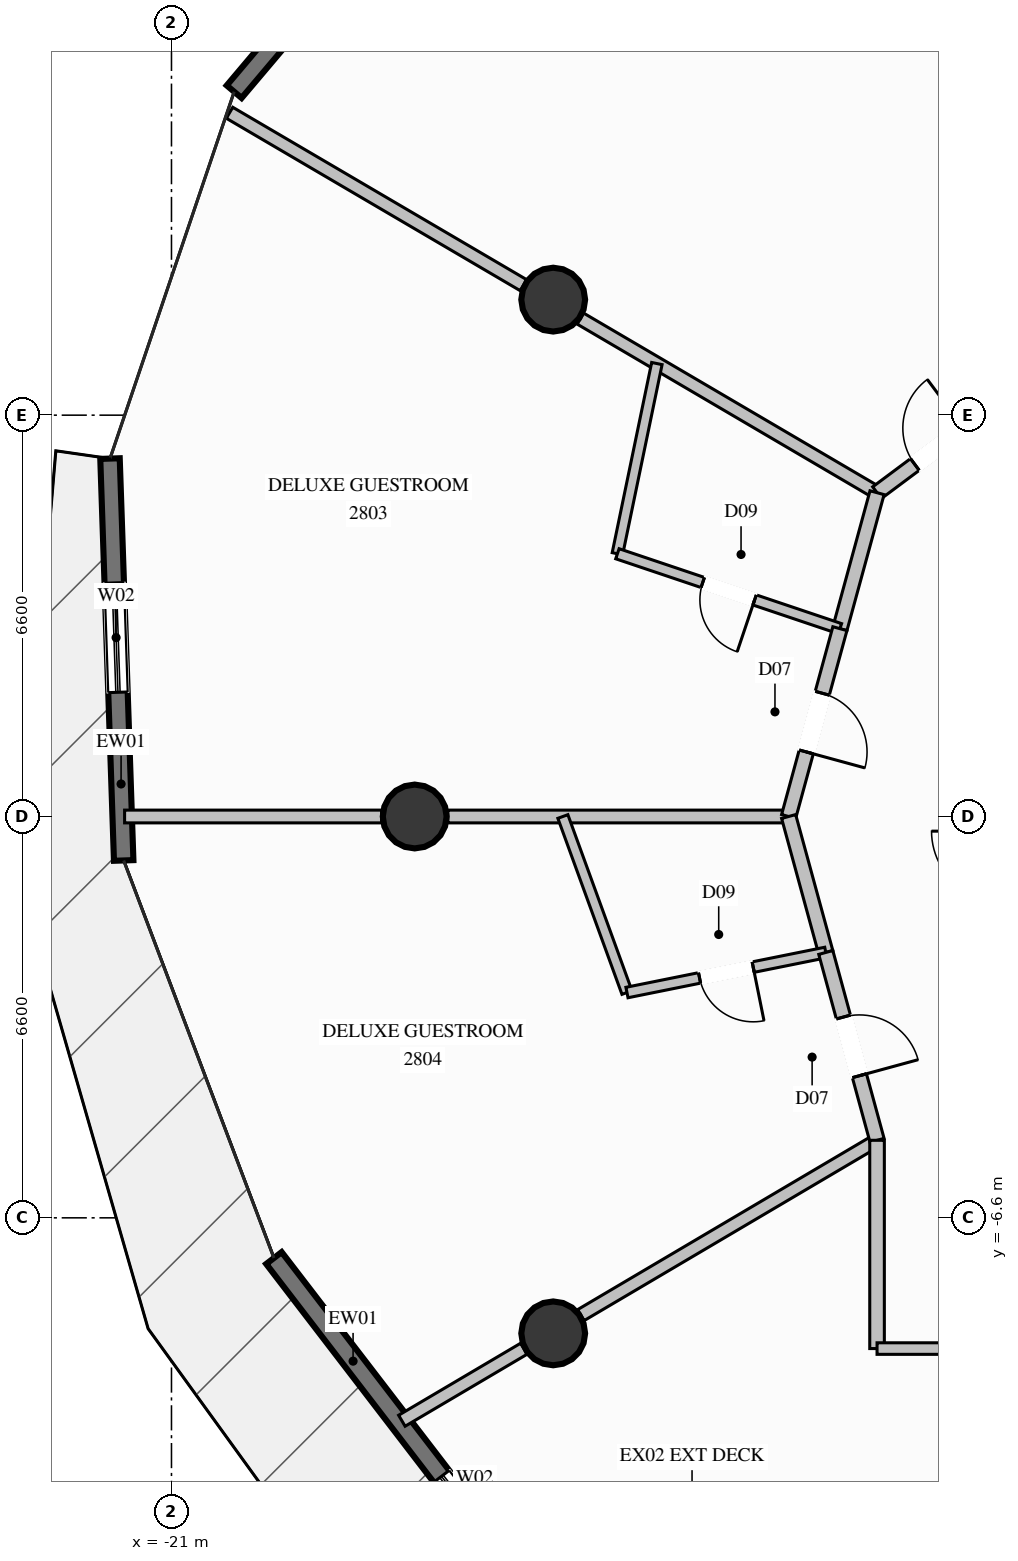
"""IFC4 building model, lengths in metres.
Left out: names, types, materials, properties, quantities, classifications, styles, units other than length and angle.
Written with IfcOpenShell. Run it as: python <this file> out.ifc"""

import sys

from ifc_helpers import new_model, si_unit, direction, frame, frame_2d, origin, origin_2d, place, context, subcontext, project, spatial, rectangle, circle, extrude, element, fill, save


model = new_model("IFC4")
c1 = context("Model", 3, precision=1e-05, world=origin(), true_north=direction((0.0, 1.0)))
c2 = subcontext(c1, "Body", "Model", "MODEL_VIEW")
j1 = project(units=[si_unit("LENGTHUNIT", "METRE"), si_unit("PLANEANGLEUNIT", "RADIAN")], contexts=[c1])
p1 = place(None, origin())
s1 = spatial("IfcSite", under=j1, at=p1, CompositionType="ELEMENT")
p2 = place(p1, origin())
s2 = spatial("IfcBuilding", under=s1, at=p2, CompositionType="ELEMENT")
p3 = place(p2, frame((0.0, 0.0, 106.2)))
s3 = spatial("IfcBuildingStorey", under=s2, at=p3, CompositionType="ELEMENT", Elevation=106.2)
for number, where, z_axis, x_axis in (
    (1, (-14.722, 8.5, 0.0), (0.0, 0.0, 1.0), (1.0, 0.0, 0.0)),
    (2, (-17.0, 0.0, 0.0), (0.0, 0.0, 1.0), (1.0, 0.0, 0.0)),
    (3, (-14.722, -8.5, 0.0), (0.0, 0.0, 1.0), (1.0, 0.0, 0.0)),
):
    element("IfcColumn", number, at=place(p3, frame(where, z_axis=z_axis, x_axis=x_axis)), inside=s3, PredefinedType="COLUMN", context=c2, shape_type="SweptSolid", body=[
        extrude(circle(Radius=0.525, at=origin_2d()), origin(), (0.0, 0.0, 1.0), 3.6),
    ])
p4 = place(p3, frame((-19.969, 11.919, 0.0), z_axis=(0.0, 0.0, 1.0), x_axis=(0.645278763483, 0.763947195425, 0.0)))
e4 = element("IfcWall", 4, at=p4, inside=s3, PredefinedType="SOLIDWALL", context=c2, shape_type="SweptSolid", body=[
    extrude(rectangle(XDim=6.369, YDim=0.32, at=frame_2d((3.185, 0.0))), origin(), (0.0, 0.0, 1.0), 3.35),
])
p5 = place(p4, frame((1.905, 0.0, 0.35)))
e5 = element("IfcOpeningElement", 5, at=p5, cuts=e4, PredefinedType="OPENING", context=c2, shape_type="SweptSolid", body=[
    extrude(rectangle(XDim=1.8, YDim=2.6, at=frame_2d((0.9, 1.3))), frame((0.0, 0.17, 0.0), z_axis=(0.0, -1.0, 0.0), x_axis=(1.0, 0.0, 0.0)), (0.0, 0.0, 1.0), 0.34),
])
p6 = place(p3, frame((-21.786, -0.723, 0.0), z_axis=(0.0, 0.0, 1.0), x_axis=(-0.034040106065, 0.999420467661, 0.0)))
e6 = element("IfcWall", 6, at=p6, inside=s3, PredefinedType="SOLIDWALL", context=c2, shape_type="SweptSolid", body=[
    extrude(rectangle(XDim=6.613, YDim=0.32, at=frame_2d((3.306, 0.0))), origin(), (0.0, 0.0, 1.0), 3.35),
])
p7 = place(p6, frame((2.767, 0.0, 0.35)))
e7 = element("IfcOpeningElement", 7, at=p7, cuts=e6, PredefinedType="OPENING", context=c2, shape_type="SweptSolid", body=[
    extrude(rectangle(XDim=1.8, YDim=2.6, at=frame_2d((0.9, 1.3))), frame((0.0, 0.17, 0.0), z_axis=(0.0, -1.0, 0.0), x_axis=(1.0, 0.0, 0.0)), (0.0, 0.0, 1.0), 0.34),
])
p8 = place(p3, frame((-14.842, -13.089, 0.0), z_axis=(0.0, 0.0, 1.0), x_axis=(-0.608831916989, 0.793299247986, 0.0)))
e8 = element("IfcWall", 8, at=p8, inside=s3, PredefinedType="SOLIDWALL", context=c2, shape_type="SweptSolid", body=[
    extrude(rectangle(XDim=7.347, YDim=0.32, at=frame_2d((3.673, 0.0))), origin(), (0.0, 0.0, 1.0), 3.35),
])
p9 = place(p8, frame((1.021, 0.0, 0.35)))
e9 = element("IfcOpeningElement", 9, at=p9, cuts=e8, PredefinedType="OPENING", context=c2, shape_type="SweptSolid", body=[
    extrude(rectangle(XDim=1.8, YDim=2.6, at=frame_2d((0.9, 1.3))), frame((0.0, 0.17, 0.0), z_axis=(0.0, -1.0, 0.0), x_axis=(1.0, 0.0, 0.0)), (0.0, 0.0, 1.0), 0.34),
])
p10 = place(p3, frame((-9.396, 5.325, 0.0), z_axis=(0.0, 0.0, 1.0), x_axis=(-0.862467386777, 0.50611264235, 0.0)))
e10 = element("IfcWall", 10, at=p10, inside=s3, PredefinedType="PARTITIONING", context=c2, shape_type="SweptSolid", body=[
    extrude(rectangle(XDim=5.657, YDim=0.21, at=frame_2d((2.829, 0.0))), origin(), (0.0, 0.0, 1.0), 2.719),
])
p11 = place(p3, frame((-15.212, 8.738, 0.0), z_axis=(0.0, 0.0, 1.0), x_axis=(-0.862556345738, 0.505961016706, 0.0)))
e11 = element("IfcWall", 11, at=p11, inside=s3, PredefinedType="PARTITIONING", context=c2, shape_type="SweptSolid", body=[
    extrude(rectangle(XDim=5.603, YDim=0.21, at=frame_2d((2.802, 0.0))), origin(), (0.0, 0.0, 1.0), 3.35),
])
p12 = place(p3, frame((-10.85, 0.0, 0.0), z_axis=(0.0, 0.0, 1.0), x_axis=(-1.0, 0.0, 0.0)))
e12 = element("IfcWall", 12, at=p12, inside=s3, PredefinedType="PARTITIONING", context=c2, shape_type="SweptSolid", body=[
    extrude(rectangle(XDim=5.605, YDim=0.21, at=frame_2d((2.802, 0.0))), origin(), (0.0, 0.0, 1.0), 3.35),
])
p13 = place(p3, frame((-17.545, 0.0, 0.0), z_axis=(0.0, 0.0, 1.0), x_axis=(-1.0, 0.0, 0.0)))
e13 = element("IfcWall", 13, at=p13, inside=s3, PredefinedType="PARTITIONING", context=c2, shape_type="SweptSolid", body=[
    extrude(rectangle(XDim=4.226, YDim=0.21, at=frame_2d((2.113, 0.0))), origin(), (0.0, 0.0, 1.0), 3.35),
])
p14 = place(p3, frame((-9.396, -5.325, 0.0), z_axis=(0.0, 0.0, 1.0), x_axis=(-0.861187639937, -0.508287171607, 0.0)))
e14 = element("IfcWall", 14, at=p14, inside=s3, PredefinedType="PARTITIONING", context=c2, shape_type="SweptSolid", body=[
    extrude(rectangle(XDim=5.656, YDim=0.21, at=frame_2d((2.828, 0.0))), origin(), (0.0, 0.0, 1.0), 2.719),
])
p15 = place(p3, frame((-15.205, -8.753, 0.0), z_axis=(0.0, 0.0, 1.0), x_axis=(-0.861151801863, -0.508347886932, 0.0)))
e15 = element("IfcWall", 15, at=p15, inside=s3, PredefinedType="PARTITIONING", context=c2, shape_type="SweptSolid", body=[
    extrude(rectangle(XDim=2.329, YDim=0.21, at=frame_2d((1.165, 0.0))), origin(), (0.0, 0.0, 1.0), 3.35),
])
p16 = place(p3, frame((-9.396, 5.325, 0.0), z_axis=(0.0, 0.0, 1.0), x_axis=(0.8017416961, 0.597670689205, 0.0)))
e16 = element("IfcWall", 16, at=p16, inside=s3, PredefinedType="PARTITIONING", context=c2, shape_type="SweptSolid", body=[
    extrude(rectangle(XDim=2.552, YDim=0.24, at=frame_2d((1.276, 0.0))), origin(), (0.0, 0.0, 1.0), 3.35),
])
p17 = place(p16, frame((0.776, 0.0, 0.0)))
e17 = element("IfcOpeningElement", 17, at=p17, cuts=e16, PredefinedType="OPENING", context=c2, shape_type="SweptSolid", body=[
    extrude(rectangle(XDim=1.0, YDim=2.2, at=frame_2d((0.5, 1.1))), frame((0.0, 0.13, 0.0), z_axis=(0.0, -1.0, 0.0), x_axis=(1.0, 0.0, 0.0)), (0.0, 0.0, 1.0), 0.26),
])
p18 = place(p3, frame((-9.396, 5.325, 0.0), z_axis=(0.0, 0.0, 1.0), x_axis=(-0.263643210908, -0.964620265878, 0.0)))
e18 = element("IfcWall", 18, at=p18, inside=s3, PredefinedType="PARTITIONING", context=c2, shape_type="SweptSolid", body=[
    extrude(rectangle(XDim=2.318, YDim=0.24, at=frame_2d((1.159, 0.0))), origin(), (0.0, 0.0, 1.0), 3.35),
])
p19 = place(p3, frame((-13.017, 7.449, 0.0), z_axis=(0.0, 0.0, 1.0), x_axis=(-0.203136275653, -0.979150475419, 0.0)))
e19 = element("IfcWall", 19, at=p19, inside=s3, PredefinedType="PLUMBINGWALL", context=c2, shape_type="SweptSolid", body=[
    extrude(rectangle(XDim=3.195, YDim=0.175, at=frame_2d((1.597, 0.0))), origin(), (0.0, 0.0, 1.0), 3.35),
])
p20 = place(p3, frame((-10.007, 3.089, 0.0), z_axis=(0.0, 0.0, 1.0), x_axis=(-0.947724103288, 0.319090933822, 0.0)))
e20 = element("IfcWall", 20, at=p20, inside=s3, PredefinedType="PLUMBINGWALL", context=c2, shape_type="SweptSolid", body=[
    extrude(rectangle(XDim=3.861, YDim=0.175, at=frame_2d((1.93, 0.0))), origin(), (0.0, 0.0, 1.0), 3.35),
])
p21 = place(p20, frame((1.48, 0.0, 0.0)))
e21 = element("IfcOpeningElement", 21, at=p21, cuts=e20, PredefinedType="OPENING", context=c2, shape_type="SweptSolid", body=[
    extrude(rectangle(XDim=0.9, YDim=2.1, at=frame_2d((0.45, 1.05))), frame((0.0, 0.098, 0.0), z_axis=(0.0, -1.0, 0.0), x_axis=(1.0, 0.0, 0.0)), (0.0, 0.0, 1.0), 0.195),
])
p22 = place(p3, frame((-10.007, 3.089, 0.0), z_axis=(0.0, 0.0, 1.0), x_axis=(-0.263272237376, -0.964721581093, 0.0)))
e22 = element("IfcWall", 22, at=p22, inside=s3, PredefinedType="PARTITIONING", context=c2, shape_type="SweptSolid", body=[
    extrude(rectangle(XDim=3.202, YDim=0.24, at=frame_2d((1.601, 0.0))), origin(), (0.0, 0.0, 1.0), 3.35),
])
p23 = place(p22, frame((1.101, 0.0, 0.0)))
e23 = element("IfcOpeningElement", 23, at=p23, cuts=e22, PredefinedType="OPENING", context=c2, shape_type="SweptSolid", body=[
    extrude(rectangle(XDim=1.0, YDim=2.2, at=frame_2d((0.5, 1.1))), frame((0.0, 0.13, 0.0), z_axis=(0.0, -1.0, 0.0), x_axis=(1.0, 0.0, 0.0)), (0.0, 0.0, 1.0), 0.26),
])
p24 = place(p3, frame((-10.85, 0.0, 0.0), z_axis=(0.0, 0.0, 1.0), x_axis=(0.263616426241, -0.964627586074, 0.0)))
e24 = element("IfcWall", 24, at=p24, inside=s3, PredefinedType="PARTITIONING", context=c2, shape_type="SweptSolid", body=[
    extrude(rectangle(XDim=2.318, YDim=0.24, at=frame_2d((1.159, 0.0))), origin(), (0.0, 0.0, 1.0), 3.35),
])
p25 = place(p3, frame((-14.563, 0.0, 0.0), z_axis=(0.0, 0.0, 1.0), x_axis=(0.342092982083, -0.939666106449, 0.0)))
e25 = element("IfcWall", 25, at=p25, inside=s3, PredefinedType="PLUMBINGWALL", context=c2, shape_type="SweptSolid", body=[
    extrude(rectangle(XDim=3.081, YDim=0.175, at=frame_2d((1.541, 0.0))), origin(), (0.0, 0.0, 1.0), 3.35),
])
p26 = place(p3, frame((-10.239, -2.236, 0.0), z_axis=(0.0, 0.0, 1.0), x_axis=(-0.980295333609, -0.197537487338, 0.0)))
e26 = element("IfcWall", 26, at=p26, inside=s3, PredefinedType="PLUMBINGWALL", context=c2, shape_type="SweptSolid", body=[
    extrude(rectangle(XDim=3.336, YDim=0.175, at=frame_2d((1.668, 0.0))), origin(), (0.0, 0.0, 1.0), 3.35),
])
p27 = place(p26, frame((1.218, 0.0, 0.0)))
e27 = element("IfcOpeningElement", 27, at=p27, cuts=e26, PredefinedType="OPENING", context=c2, shape_type="SweptSolid", body=[
    extrude(rectangle(XDim=0.9, YDim=2.1, at=frame_2d((0.45, 1.05))), frame((0.0, 0.098, 0.0), z_axis=(0.0, -1.0, 0.0), x_axis=(1.0, 0.0, 0.0)), (0.0, 0.0, 1.0), 0.195),
])
p28 = place(p3, frame((-10.239, -2.236, 0.0), z_axis=(0.0, 0.0, 1.0), x_axis=(0.26329160366, -0.964716295831, 0.0)))
e28 = element("IfcWall", 28, at=p28, inside=s3, PredefinedType="PARTITIONING", context=c2, shape_type="SweptSolid", body=[
    extrude(rectangle(XDim=3.202, YDim=0.24, at=frame_2d((1.601, 0.0))), origin(), (0.0, 0.0, 1.0), 3.35),
])
p29 = place(p28, frame((1.101, 0.0, 0.0)))
e29 = element("IfcOpeningElement", 29, at=p29, cuts=e28, PredefinedType="OPENING", context=c2, shape_type="SweptSolid", body=[
    extrude(rectangle(XDim=1.0, YDim=2.2, at=frame_2d((0.5, 1.1))), frame((0.0, 0.13, 0.0), z_axis=(0.0, -1.0, 0.0), x_axis=(1.0, 0.0, 0.0)), (0.0, 0.0, 1.0), 0.26),
])
p30 = place(p3, frame((-9.396, -5.325, 0.0), z_axis=(0.0, 0.0, 1.0), x_axis=(0.0, -1.0, 0.0)))
e30 = element("IfcWall", 30, at=p30, inside=s3, PredefinedType="PARTITIONING", context=c2, shape_type="SweptSolid", body=[
    extrude(rectangle(XDim=3.425, YDim=0.24, at=frame_2d((1.712, 0.0))), origin(), (0.0, 0.0, 1.0), 3.35),
])
p31 = place(p3, frame((-9.396, -8.75, 0.0), z_axis=(0.0, 0.0, 1.0), x_axis=(1.0, 0.0, 0.0)))
e31 = element("IfcWall", 31, at=p31, inside=s3, PredefinedType="PARTITIONING", context=c2, shape_type="SweptSolid", body=[
    extrude(rectangle(XDim=4.228, YDim=0.19, at=frame_2d((2.114, 0.0))), origin(), (0.0, 0.0, 1.0), 3.35),
])
p32 = place(p31, frame((1.639, 0.0, 0.0)))
e32 = element("IfcOpeningElement", 32, at=p32, cuts=e31, PredefinedType="OPENING", context=c2, shape_type="SweptSolid", body=[
    extrude(rectangle(XDim=0.95, YDim=2.1, at=frame_2d((0.475, 1.05))), frame((0.0, 0.105, 0.0), z_axis=(0.0, -1.0, 0.0), x_axis=(1.0, 0.0, 0.0)), (0.0, 0.0, 1.0), 0.21),
])
p33 = place(p7, origin())
e33 = element("IfcWindow", 33, at=p33, inside=s3, PartitioningType="SINGLE_PANEL", PredefinedType="WINDOW", context=c2, shape_type="SweptSolid", body=[
    extrude(rectangle(XDim=1.8, YDim=2.6, at=frame_2d((0.9, 1.3))), frame((0.0, 0.03, 0.0), z_axis=(0.0, -1.0, 0.0), x_axis=(1.0, 0.0, 0.0)), (0.0, 0.0, 1.0), 0.06),
])
fill(e7, e33)
p34 = place(p9, origin())
e34 = element("IfcWindow", 34, at=p34, inside=s3, PartitioningType="SINGLE_PANEL", PredefinedType="WINDOW", context=c2, shape_type="SweptSolid", body=[
    extrude(rectangle(XDim=1.8, YDim=2.6, at=frame_2d((0.9, 1.3))), frame((0.0, 0.03, 0.0), z_axis=(0.0, -1.0, 0.0), x_axis=(1.0, 0.0, 0.0)), (0.0, 0.0, 1.0), 0.06),
])
fill(e9, e34)
p35 = place(p17, origin())
e35 = element("IfcDoor", 35, at=p35, inside=s3, OperationType="SINGLE_SWING_RIGHT", PredefinedType="DOOR", context=c2, shape_type="SweptSolid", body=[
    extrude(rectangle(XDim=1.0, YDim=2.2, at=frame_2d((0.5, 1.1))), frame((0.0, 0.025, 0.0), z_axis=(0.0, -1.0, 0.0), x_axis=(1.0, 0.0, 0.0)), (0.0, 0.0, 1.0), 0.05),
])
fill(e17, e35)
p36 = place(p21, origin())
e36 = element("IfcDoor", 36, at=p36, inside=s3, OperationType="SINGLE_SWING_LEFT", PredefinedType="DOOR", context=c2, shape_type="SweptSolid", body=[
    extrude(rectangle(XDim=0.9, YDim=2.1, at=frame_2d((0.45, 1.05))), frame((0.0, 0.025, 0.0), z_axis=(0.0, -1.0, 0.0), x_axis=(1.0, 0.0, 0.0)), (0.0, 0.0, 1.0), 0.05),
])
fill(e21, e36)
p37 = place(p23, origin())
e37 = element("IfcDoor", 37, at=p37, inside=s3, OperationType="SINGLE_SWING_RIGHT", PredefinedType="DOOR", context=c2, shape_type="SweptSolid", body=[
    extrude(rectangle(XDim=1.0, YDim=2.2, at=frame_2d((0.5, 1.1))), frame((0.0, 0.025, 0.0), z_axis=(0.0, -1.0, 0.0), x_axis=(1.0, 0.0, 0.0)), (0.0, 0.0, 1.0), 0.05),
])
fill(e23, e37)
p38 = place(p27, origin())
e38 = element("IfcDoor", 38, at=p38, inside=s3, OperationType="SINGLE_SWING_LEFT", PredefinedType="DOOR", context=c2, shape_type="SweptSolid", body=[
    extrude(rectangle(XDim=0.9, YDim=2.1, at=frame_2d((0.45, 1.05))), frame((0.0, 0.025, 0.0), z_axis=(0.0, -1.0, 0.0), x_axis=(1.0, 0.0, 0.0)), (0.0, 0.0, 1.0), 0.05),
])
fill(e27, e38)
p39 = place(p29, origin())
e39 = element("IfcDoor", 39, at=p39, inside=s3, OperationType="SINGLE_SWING_RIGHT", PredefinedType="DOOR", context=c2, shape_type="SweptSolid", body=[
    extrude(rectangle(XDim=1.0, YDim=2.2, at=frame_2d((0.5, 1.1))), frame((0.0, 0.025, 0.0), z_axis=(0.0, -1.0, 0.0), x_axis=(1.0, 0.0, 0.0)), (0.0, 0.0, 1.0), 0.05),
])
fill(e29, e39)
save(model, sys.argv[1])
